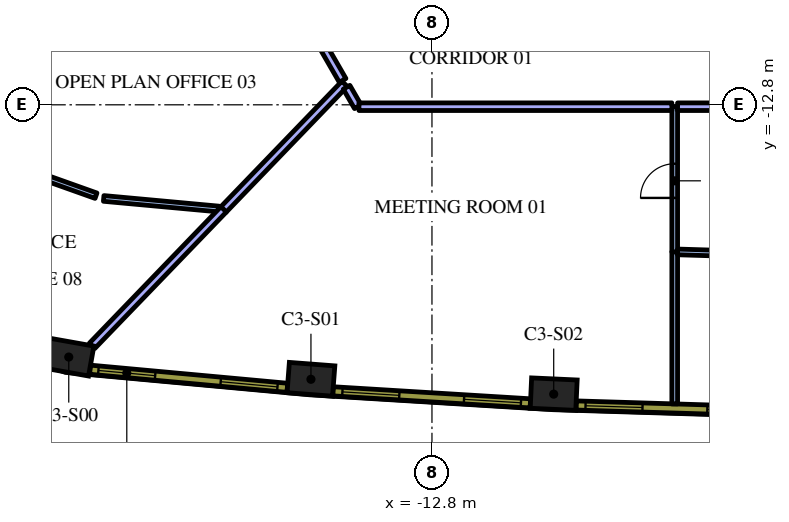
"""IFC4 building model, lengths in metres.
Left out: names, types, materials, properties, quantities, classifications, styles, units other than length and angle.
Written with IfcOpenShell. Run it as: python <this file> out.ifc"""

import sys

from ifc_helpers import new_model, si_unit, direction, frame, frame_2d, origin, origin_2d, place, context, subcontext, project, spatial, rectangle, extrude, element, fill, save


model = new_model("IFC4")
c1 = context("Model", 3, precision=1e-05, world=origin(), true_north=direction((0.0, 1.0)))
c2 = subcontext(c1, "Body", "Model", "MODEL_VIEW")
j1 = project(units=[si_unit("LENGTHUNIT", "METRE"), si_unit("PLANEANGLEUNIT", "RADIAN")], contexts=[c1])
p1 = place(None, origin())
s1 = spatial("IfcSite", under=j1, at=p1, CompositionType="ELEMENT")
p2 = place(p1, origin())
s2 = spatial("IfcBuilding", under=s1, at=p2, CompositionType="ELEMENT")
p3 = place(p2, frame((0.0, 0.0, 171.0)))
s3 = spatial("IfcBuildingStorey", under=s2, at=p3, CompositionType="ELEMENT", Elevation=171.0)
for number, where, z_axis, x_axis in (
    (1, (-22.357, -19.437, 0.0), (0.0, 0.0, 1.0), (0.985, -0.175, 0.0)),
    (2, (-15.985, -20.022, 0.0), (0.0, 0.0, 1.0), (0.997, -0.076, 0.0)),
    (3, (-9.597, -20.413, 0.0), (0.0, 0.0, 1.0), (0.999, -0.046, 0.0)),
):
    element("IfcColumn", number, at=place(p3, frame(where, z_axis=z_axis, x_axis=x_axis)), inside=s3, PredefinedType="COLUMN", context=c2, shape_type="SweptSolid", body=[
        extrude(rectangle(XDim=1.2, YDim=0.8, at=origin_2d()), origin(), (0.0, 0.0, 1.0), 4.2),
    ])
p4 = place(p3, frame((-6.412, -16.664, 0.0), z_axis=(0.0, 0.0, 1.0), x_axis=(0.0, -1.0, 0.0)))
e4 = element("IfcWall", 4, at=p4, inside=s3, PredefinedType="PARTITIONING", context=c2, shape_type="SweptSolid", body=[
    extrude(rectangle(XDim=4.006, YDim=0.15, at=frame_2d((2.003, 0.0))), origin(), (0.0, 0.0, 1.0), 3.15),
])
p5 = place(p3, frame((-6.412, -16.672, 0.0), z_axis=(0.0, 0.0, 1.0), x_axis=(0.0, 1.0, 0.0)))
e5 = element("IfcWall", 5, at=p5, inside=s3, PredefinedType="PARTITIONING", context=c2, shape_type="SweptSolid", body=[
    extrude(rectangle(XDim=3.822, YDim=0.15, at=frame_2d((1.911, 0.0))), origin(), (0.0, 0.0, 1.0), 3.15),
])
p6 = place(p5, frame((1.422, 0.0, 0.0)))
e6 = element("IfcOpeningElement", 6, at=p6, cuts=e5, PredefinedType="OPENING", context=c2, shape_type="SweptSolid", body=[
    extrude(rectangle(XDim=0.9, YDim=2.1, at=frame_2d((0.45, 1.05))), frame((0.0, 0.085, 0.0), z_axis=(0.0, -1.0, 0.0), x_axis=(1.0, 0.0, 0.0)), (0.0, 0.0, 1.0), 0.17),
])
p7 = place(p3, frame((-18.288, -15.557, 0.0), z_axis=(0.0, 0.0, 1.0), x_axis=(0.693944823318, 0.720028181525, 0.0)))
e7 = element("IfcWall", 7, at=p7, inside=s3, PredefinedType="PARTITIONING", context=c2, shape_type="SweptSolid", body=[
    extrude(rectangle(XDim=4.596, YDim=0.2, at=frame_2d((2.298, 0.0))), origin(), (0.0, 0.0, 1.0), 3.15),
])
p8 = place(p3, frame((-21.742, -19.14, 0.0), z_axis=(0.0, 0.0, 1.0), x_axis=(0.693986944276, 0.719987584042, 0.0)))
e8 = element("IfcWall", 8, at=p8, inside=s3, PredefinedType="PARTITIONING", context=c2, shape_type="SweptSolid", body=[
    extrude(rectangle(XDim=4.986, YDim=0.2, at=frame_2d((2.493, 0.0))), origin(), (0.0, 0.0, 1.0), 3.15),
])
p9 = place(p3, frame((-15.047, -12.338, 0.0), z_axis=(0.0, 0.0, 1.0), x_axis=(0.500091824179, -0.865972382579, 0.0)))
e9 = element("IfcWall", 9, at=p9, inside=s3, PredefinedType="PARTITIONING", context=c2, shape_type="SweptSolid", body=[
    extrude(rectangle(XDim=0.591, YDim=0.2, at=frame_2d((0.296, 0.0))), origin(), (0.0, 0.0, 1.0), 3.15),
])
p10 = place(p3, frame((-14.721, -12.85, 0.0), z_axis=(0.0, 0.0, 1.0), x_axis=(1.0, 0.0, 0.0)))
e10 = element("IfcWall", 10, at=p10, inside=s3, PredefinedType="PARTITIONING", context=c2, shape_type="SweptSolid", body=[
    extrude(rectangle(XDim=8.234, YDim=0.2, at=frame_2d((4.117, 0.0))), origin(), (0.0, 0.0, 1.0), 3.15),
])
p11 = place(p3, frame((-6.337, -16.671, 0.0), z_axis=(0.0, 0.0, 1.0), x_axis=(0.999533369646, -0.030545751995, 0.0)))
e11 = element("IfcWall", 11, at=p11, inside=s3, PredefinedType="PARTITIONING", context=c2, shape_type="SweptSolid", body=[
    extrude(rectangle(XDim=3.197, YDim=0.15, at=frame_2d((1.599, 0.0))), origin(), (0.0, 0.0, 1.0), 3.15),
])
p12 = place(p3, frame((-6.337, -12.85, 0.0), z_axis=(0.0, 0.0, 1.0), x_axis=(1.0, 0.0, 0.0)))
e12 = element("IfcWall", 12, at=p12, inside=s3, PredefinedType="PARTITIONING", context=c2, shape_type="SweptSolid", body=[
    extrude(rectangle(XDim=2.303, YDim=0.2, at=frame_2d((1.151, 0.0))), origin(), (0.0, 0.0, 1.0), 3.15),
])
p13 = place(p3, frame((-18.412, -15.542, 0.0), z_axis=(0.0, 0.0, 1.0), x_axis=(-0.995812481052, 0.091419377496, 0.0)))
e13 = element("IfcWall", 13, at=p13, inside=s3, PredefinedType="PARTITIONING", context=c2, shape_type="SweptSolid", body=[
    extrude(rectangle(XDim=3.039, YDim=0.15, at=frame_2d((1.52, 0.0))), origin(), (0.0, 0.0, 1.0), 3.15),
])
p14 = place(p3, frame((-21.64, -15.192, 0.0), z_axis=(0.0, 0.0, 1.0), x_axis=(-0.942099140138, 0.335334475041, 0.0)))
e14 = element("IfcWall", 14, at=p14, inside=s3, PredefinedType="PARTITIONING", context=c2, shape_type="SweptSolid", body=[
    extrude(rectangle(XDim=1.498, YDim=0.15, at=frame_2d((0.749, 0.0))), origin(), (0.0, 0.0, 1.0), 3.15),
])
p15 = place(p3, frame((-18.489, -6.376, 0.0), z_axis=(0.0, 0.0, 1.0), x_axis=(0.499989401968, -0.866031522475, 0.0)))
e15 = element("IfcWall", 15, at=p15, inside=s3, PredefinedType="PARTITIONING", context=c2, shape_type="SweptSolid", body=[
    extrude(rectangle(XDim=6.677, YDim=0.2, at=frame_2d((3.338, 0.0))), origin(), (0.0, 0.0, 1.0), 3.15),
])
p16 = place(p3, frame((-21.797, -19.77, 0.0), z_axis=(0.0, 0.0, 1.0), x_axis=(0.995808712151, -0.091460422067, 0.0)))
e16 = element("IfcWall", 16, at=p16, inside=s3, PredefinedType="SOLIDWALL", context=c2, shape_type="SweptSolid", body=[
    extrude(rectangle(XDim=5.213, YDim=0.24, at=frame_2d((2.606, 0.0))), origin(), (0.0, 0.0, 1.0), 3.95),
])
p17 = place(p16, frame((0.221, 0.0, 0.9)))
e17 = element("IfcOpeningElement", 17, at=p17, cuts=e16, PredefinedType="OPENING", context=c2, shape_type="SweptSolid", body=[
    extrude(rectangle(XDim=1.5, YDim=2.55, at=frame_2d((0.75, 1.275))), frame((0.0, 0.13, 0.0), z_axis=(0.0, -1.0, 0.0), x_axis=(1.0, 0.0, 0.0)), (0.0, 0.0, 1.0), 0.26),
])
p18 = place(p16, frame((3.452, 0.0, 0.9)))
e18 = element("IfcOpeningElement", 18, at=p18, cuts=e16, PredefinedType="OPENING", context=c2, shape_type="SweptSolid", body=[
    extrude(rectangle(XDim=1.5, YDim=2.55, at=frame_2d((0.75, 1.275))), frame((0.0, 0.13, 0.0), z_axis=(0.0, -1.0, 0.0), x_axis=(1.0, 0.0, 0.0)), (0.0, 0.0, 1.0), 0.26),
])
p19 = place(p3, frame((-15.405, -20.338, 0.0), z_axis=(0.0, 0.0, 1.0), x_axis=(0.998135294646, -0.061040425794, 0.0)))
e19 = element("IfcWall", 19, at=p19, inside=s3, PredefinedType="SOLIDWALL", context=c2, shape_type="SweptSolid", body=[
    extrude(rectangle(XDim=5.204, YDim=0.24, at=frame_2d((2.602, 0.0))), origin(), (0.0, 0.0, 1.0), 3.95),
])
p20 = place(p19, frame((0.248, 0.0, 0.9)))
e20 = element("IfcOpeningElement", 20, at=p20, cuts=e19, PredefinedType="OPENING", context=c2, shape_type="SweptSolid", body=[
    extrude(rectangle(XDim=1.5, YDim=2.55, at=frame_2d((0.75, 1.275))), frame((0.0, 0.13, 0.0), z_axis=(0.0, -1.0, 0.0), x_axis=(1.0, 0.0, 0.0)), (0.0, 0.0, 1.0), 0.26),
])
p21 = place(p19, frame((3.455, 0.0, 0.9)))
e21 = element("IfcOpeningElement", 21, at=p21, cuts=e19, PredefinedType="OPENING", context=c2, shape_type="SweptSolid", body=[
    extrude(rectangle(XDim=1.5, YDim=2.55, at=frame_2d((0.75, 1.275))), frame((0.0, 0.13, 0.0), z_axis=(0.0, -1.0, 0.0), x_axis=(1.0, 0.0, 0.0)), (0.0, 0.0, 1.0), 0.26),
])
p22 = place(p3, frame((-9.007, -20.711, 0.0), z_axis=(0.0, 0.0, 1.0), x_axis=(0.999533441983, -0.030543384845, 0.0)))
e22 = element("IfcWall", 22, at=p22, inside=s3, PredefinedType="SOLIDWALL", context=c2, shape_type="SweptSolid", body=[
    extrude(rectangle(XDim=5.204, YDim=0.24, at=frame_2d((2.602, 0.0))), origin(), (0.0, 0.0, 1.0), 3.95),
])
p23 = place(p22, frame((0.248, 0.0, 0.9)))
e23 = element("IfcOpeningElement", 23, at=p23, cuts=e22, PredefinedType="OPENING", context=c2, shape_type="SweptSolid", body=[
    extrude(rectangle(XDim=1.5, YDim=2.55, at=frame_2d((0.75, 1.275))), frame((0.0, 0.13, 0.0), z_axis=(0.0, -1.0, 0.0), x_axis=(1.0, 0.0, 0.0)), (0.0, 0.0, 1.0), 0.26),
])
p24 = place(p22, frame((3.455, 0.0, 0.9)))
e24 = element("IfcOpeningElement", 24, at=p24, cuts=e22, PredefinedType="OPENING", context=c2, shape_type="SweptSolid", body=[
    extrude(rectangle(XDim=1.5, YDim=2.55, at=frame_2d((0.75, 1.275))), frame((0.0, 0.13, 0.0), z_axis=(0.0, -1.0, 0.0), x_axis=(1.0, 0.0, 0.0)), (0.0, 0.0, 1.0), 0.26),
])
p25 = place(p6, origin())
e25 = element("IfcDoor", 25, at=p25, inside=s3, OperationType="SINGLE_SWING_LEFT", PredefinedType="DOOR", context=c2, shape_type="SweptSolid", body=[
    extrude(rectangle(XDim=0.9, YDim=2.1, at=frame_2d((0.45, 1.05))), frame((0.0, 0.025, 0.0), z_axis=(0.0, -1.0, 0.0), x_axis=(1.0, 0.0, 0.0)), (0.0, 0.0, 1.0), 0.05),
])
fill(e6, e25)
p26 = place(p17, origin())
e26 = element("IfcWindow", 26, at=p26, inside=s3, PartitioningType="SINGLE_PANEL", PredefinedType="WINDOW", context=c2, shape_type="SweptSolid", body=[
    extrude(rectangle(XDim=1.5, YDim=2.55, at=frame_2d((0.75, 1.275))), frame((0.0, 0.04, 0.0), z_axis=(0.0, -1.0, 0.0), x_axis=(1.0, 0.0, 0.0)), (0.0, 0.0, 1.0), 0.06),
])
fill(e17, e26)
p27 = place(p18, origin())
e27 = element("IfcWindow", 27, at=p27, inside=s3, PartitioningType="SINGLE_PANEL", PredefinedType="WINDOW", context=c2, shape_type="SweptSolid", body=[
    extrude(rectangle(XDim=1.5, YDim=2.55, at=frame_2d((0.75, 1.275))), frame((0.0, 0.04, 0.0), z_axis=(0.0, -1.0, 0.0), x_axis=(1.0, 0.0, 0.0)), (0.0, 0.0, 1.0), 0.06),
])
fill(e18, e27)
p28 = place(p20, origin())
e28 = element("IfcWindow", 28, at=p28, inside=s3, PartitioningType="SINGLE_PANEL", PredefinedType="WINDOW", context=c2, shape_type="SweptSolid", body=[
    extrude(rectangle(XDim=1.5, YDim=2.55, at=frame_2d((0.75, 1.275))), frame((0.0, 0.04, 0.0), z_axis=(0.0, -1.0, 0.0), x_axis=(1.0, 0.0, 0.0)), (0.0, 0.0, 1.0), 0.06),
])
fill(e20, e28)
p29 = place(p21, origin())
e29 = element("IfcWindow", 29, at=p29, inside=s3, PartitioningType="SINGLE_PANEL", PredefinedType="WINDOW", context=c2, shape_type="SweptSolid", body=[
    extrude(rectangle(XDim=1.5, YDim=2.55, at=frame_2d((0.75, 1.275))), frame((0.0, 0.04, 0.0), z_axis=(0.0, -1.0, 0.0), x_axis=(1.0, 0.0, 0.0)), (0.0, 0.0, 1.0), 0.06),
])
fill(e21, e29)
p30 = place(p23, origin())
e30 = element("IfcWindow", 30, at=p30, inside=s3, PartitioningType="SINGLE_PANEL", PredefinedType="WINDOW", context=c2, shape_type="SweptSolid", body=[
    extrude(rectangle(XDim=1.5, YDim=2.55, at=frame_2d((0.75, 1.275))), frame((0.0, 0.04, 0.0), z_axis=(0.0, -1.0, 0.0), x_axis=(1.0, 0.0, 0.0)), (0.0, 0.0, 1.0), 0.06),
])
fill(e23, e30)
p31 = place(p24, origin())
e31 = element("IfcWindow", 31, at=p31, inside=s3, PartitioningType="SINGLE_PANEL", PredefinedType="WINDOW", context=c2, shape_type="SweptSolid", body=[
    extrude(rectangle(XDim=1.5, YDim=2.55, at=frame_2d((0.75, 1.275))), frame((0.0, 0.04, 0.0), z_axis=(0.0, -1.0, 0.0), x_axis=(1.0, 0.0, 0.0)), (0.0, 0.0, 1.0), 0.06),
])
fill(e24, e31)
save(model, sys.argv[1])
